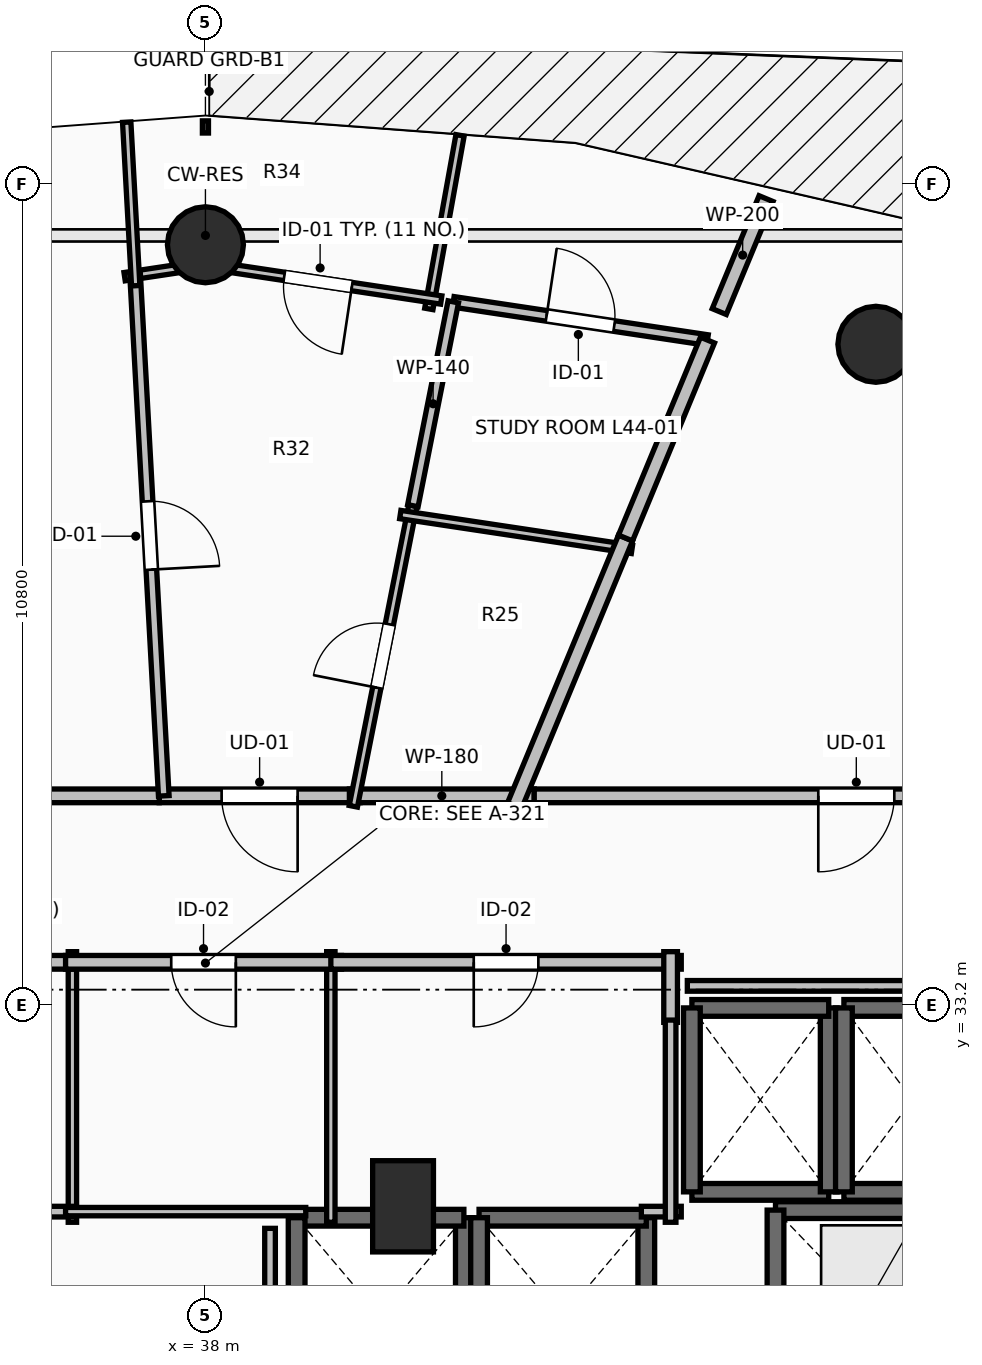
"""IFC4 building model, lengths in metres.
Left out: names, types, materials, properties, quantities, classifications, styles, units other than length and angle.
Written with IfcOpenShell. Run it as: python <this file> out.ifc"""

import sys

from ifc_helpers import new_model, si_unit, direction, frame, frame_2d, origin, origin_2d, place, context, subcontext, project, spatial, rectangle, circle, extrude, element, fill, save


model = new_model("IFC4")
c1 = context("Model", 3, precision=1e-05, world=origin(), true_north=direction((0.0, 1.0)))
c2 = subcontext(c1, "Body", "Model", "MODEL_VIEW")
j1 = project(units=[si_unit("LENGTHUNIT", "METRE"), si_unit("PLANEANGLEUNIT", "RADIAN")], contexts=[c1])
p1 = place(None, origin())
s1 = spatial("IfcSite", under=j1, at=p1, CompositionType="ELEMENT")
p2 = place(p1, origin())
s2 = spatial("IfcBuilding", under=s1, at=p2, CompositionType="ELEMENT")
p3 = place(p2, frame((0.0, 0.0, 164.1)))
s3 = spatial("IfcBuildingStorey", under=s2, at=p3, CompositionType="ELEMENT", Elevation=164.1)
for number, where, z_axis, x_axis in (
    (1, (46.821, 41.891, 0.0), (0.0, 0.0, 1.0), (0.383, 0.924, 0.0)),
    (2, (38.0, 43.2, 0.0), (0.0, 0.0, 1.0), (0.0, 1.0, 0.0)),
):
    element("IfcColumn", number, at=place(p3, frame(where, z_axis=z_axis, x_axis=x_axis)), inside=s3, PredefinedType="COLUMN", context=c2, shape_type="SweptSolid", body=[
        extrude(circle(Radius=0.5, at=origin_2d()), origin(), (0.0, 0.0, 1.0), 3.5),
    ])
p4 = place(p3, frame((40.6, 30.55, 0.0), z_axis=(0.0, 0.0, 1.0), x_axis=(1.0, 0.0, 0.0)))
e3 = element("IfcColumn", 3, at=p4, inside=s3, PredefinedType="PILASTER", context=c2, shape_type="SweptSolid", body=[
    extrude(rectangle(XDim=0.8, YDim=1.2, at=origin_2d()), origin(), (0.0, 0.0, 1.0), 3.5),
])
p5 = place(p3, frame((41.4, 27.8, 0.0), z_axis=(0.0, 0.0, 1.0), x_axis=(0.0, 1.0, 0.0)))
e4 = element("IfcWall", 4, at=p5, inside=s3, PredefinedType="SOLIDWALL", context=c2, shape_type="SweptSolid", body=[
    extrude(rectangle(XDim=2.6, YDim=0.22, at=frame_2d((1.3, 0.0))), origin(), (0.0, 0.0, 1.0), 3.24),
])
p6 = place(p3, frame((41.4, 30.4, 0.0), z_axis=(0.0, 0.0, 1.0), x_axis=(-1.0, 0.0, 0.0)))
e5 = element("IfcWall", 5, at=p6, inside=s3, PredefinedType="SOLIDWALL", context=c2, shape_type="SweptSolid", body=[
    extrude(rectangle(XDim=2.2, YDim=0.22, at=frame_2d((1.1, 0.0))), origin(), (0.0, 0.0, 1.0), 3.24),
])
for number, where, z_axis, x_axis in (
    (6, (39.2, 30.4, 0.0), (0.0, 0.0, 1.0), (0.0, -1.0, 0.0)),
    (7, (43.8, 27.8, 0.0), (0.0, 0.0, 1.0), (0.0, 1.0, 0.0)),
):
    element("IfcWall", number, at=place(p3, frame(where, z_axis=z_axis, x_axis=x_axis)), inside=s3, PredefinedType="SOLIDWALL", context=c2, shape_type="SweptSolid", body=[
        extrude(rectangle(XDim=2.6, YDim=0.22, at=frame_2d((1.3, 0.0))), origin(), (0.0, 0.0, 1.0), 3.24),
    ])
p7 = place(p3, frame((43.8, 30.4, 0.0), z_axis=(0.0, 0.0, 1.0), x_axis=(-1.0, 0.0, 0.0)))
e8 = element("IfcWall", 8, at=p7, inside=s3, PredefinedType="SOLIDWALL", context=c2, shape_type="SweptSolid", body=[
    extrude(rectangle(XDim=2.2, YDim=0.22, at=frame_2d((1.1, 0.0))), origin(), (0.0, 0.0, 1.0), 3.24),
])
p8 = place(p3, frame((41.6, 30.4, 0.0), z_axis=(0.0, 0.0, 1.0), x_axis=(0.0, -1.0, 0.0)))
e9 = element("IfcWall", 9, at=p8, inside=s3, PredefinedType="SOLIDWALL", context=c2, shape_type="SweptSolid", body=[
    extrude(rectangle(XDim=2.6, YDim=0.22, at=frame_2d((1.3, 0.0))), origin(), (0.0, 0.0, 1.0), 3.24),
])
p9 = place(p3, frame((44.4, 30.74, 0.0), z_axis=(0.0, 0.0, 1.0), x_axis=(1.0, 0.0, 0.0)))
e10 = element("IfcWall", 10, at=p9, inside=s3, PredefinedType="SOLIDWALL", context=c2, shape_type="SweptSolid", body=[
    extrude(rectangle(XDim=1.8, YDim=0.22, at=frame_2d((0.9, 0.0))), origin(), (0.0, 0.0, 1.0), 3.24),
])
p10 = place(p3, frame((46.2, 30.74, 0.0), z_axis=(0.0, 0.0, 1.0), x_axis=(0.0, 1.0, 0.0)))
e11 = element("IfcWall", 11, at=p10, inside=s3, PredefinedType="SOLIDWALL", context=c2, shape_type="SweptSolid", body=[
    extrude(rectangle(XDim=2.42, YDim=0.22, at=frame_2d((1.21, 0.0))), origin(), (0.0, 0.0, 1.0), 3.24),
])
p11 = place(p3, frame((46.2, 33.16, 0.0), z_axis=(0.0, 0.0, 1.0), x_axis=(-1.0, 0.0, 0.0)))
e12 = element("IfcWall", 12, at=p11, inside=s3, PredefinedType="SOLIDWALL", context=c2, shape_type="SweptSolid", body=[
    extrude(rectangle(XDim=1.8, YDim=0.22, at=frame_2d((0.9, 0.0))), origin(), (0.0, 0.0, 1.0), 3.24),
])
p12 = place(p3, frame((44.4, 33.16, 0.0), z_axis=(0.0, 0.0, 1.0), x_axis=(0.0, -1.0, 0.0)))
e13 = element("IfcWall", 13, at=p12, inside=s3, PredefinedType="SOLIDWALL", context=c2, shape_type="SweptSolid", body=[
    extrude(rectangle(XDim=2.42, YDim=0.22, at=frame_2d((1.21, 0.0))), origin(), (0.0, 0.0, 1.0), 3.24),
])
for number, where, z_axis, x_axis in (
    (14, (46.4, 30.74, 0.0), (0.0, 0.0, 1.0), (1.0, 0.0, 0.0)),
    (15, (48.2, 33.16, 0.0), (0.0, 0.0, 1.0), (-1.0, 0.0, 0.0)),
):
    element("IfcWall", number, at=place(p3, frame(where, z_axis=z_axis, x_axis=x_axis)), inside=s3, PredefinedType="SOLIDWALL", context=c2, shape_type="SweptSolid", body=[
        extrude(rectangle(XDim=1.8, YDim=0.22, at=frame_2d((0.9, 0.0))), origin(), (0.0, 0.0, 1.0), 3.24),
    ])
p13 = place(p3, frame((46.4, 33.16, 0.0), z_axis=(0.0, 0.0, 1.0), x_axis=(0.0, -1.0, 0.0)))
e16 = element("IfcWall", 16, at=p13, inside=s3, PredefinedType="SOLIDWALL", context=c2, shape_type="SweptSolid", body=[
    extrude(rectangle(XDim=2.42, YDim=0.22, at=frame_2d((1.21, 0.0))), origin(), (0.0, 0.0, 1.0), 3.24),
])
p14 = place(p3, frame((47.9, 30.5, 0.0), z_axis=(0.0, 0.0, 1.0), x_axis=(-1.0, 0.0, 0.0)))
e17 = element("IfcWall", 17, at=p14, inside=s3, PredefinedType="SHEAR", context=c2, shape_type="SweptSolid", body=[
    extrude(rectangle(XDim=2.4, YDim=0.22, at=frame_2d((1.2, 0.0))), origin(), (0.0, 0.0, 1.0), 3.24),
])
p15 = place(p3, frame((45.5, 30.5, 0.0), z_axis=(0.0, 0.0, 1.0), x_axis=(0.0, -1.0, 0.0)))
e18 = element("IfcWall", 18, at=p15, inside=s3, PredefinedType="SHEAR", context=c2, shape_type="SweptSolid", body=[
    extrude(rectangle(XDim=2.5, YDim=0.22, at=frame_2d((1.25, 0.0))), origin(), (0.0, 0.0, 1.0), 3.24),
])
p16 = place(p3, frame((36.25, 30.34, 0.0), z_axis=(0.0, 0.0, 1.0), x_axis=(0.0, 1.0, 0.0)))
e19 = element("IfcWall", 19, at=p16, inside=s3, PredefinedType="PARTITIONING", context=c2, shape_type="SweptSolid", body=[
    extrude(rectangle(XDim=3.56, YDim=0.11, at=frame_2d((1.78, 0.0))), origin(), (0.0, 0.0, 1.0), 2.432),
])
p17 = place(p3, frame((33.5, 30.48, 0.0), z_axis=(0.0, 0.0, 1.0), x_axis=(1.0, 0.0, 0.0)))
e20 = element("IfcWall", 20, at=p17, inside=s3, PredefinedType="PARTITIONING", context=c2, shape_type="SweptSolid", body=[
    extrude(rectangle(XDim=2.75, YDim=0.14, at=frame_2d((1.375, 0.0))), origin(), (0.0, 0.0, 1.0), 2.432),
])
p18 = place(p3, frame((36.25, 33.76, 0.0), z_axis=(0.0, 0.0, 1.0), x_axis=(-1.0, 0.0, 0.0)))
e21 = element("IfcWall", 21, at=p18, inside=s3, PredefinedType="PARTITIONING", context=c2, shape_type="SweptSolid", body=[
    extrude(rectangle(XDim=2.75, YDim=0.18, at=frame_2d((1.375, 0.0))), origin(), (0.0, 0.0, 1.0), 3.24),
])
p19 = place(p18, frame((0.95, 0.0, 0.0)))
e22 = element("IfcOpeningElement", 22, at=p19, cuts=e21, PredefinedType="OPENING", context=c2, shape_type="SweptSolid", body=[
    extrude(rectangle(XDim=0.85, YDim=2.1, at=frame_2d((0.425, 1.05))), frame((0.0, 0.105, 0.0), z_axis=(0.0, -1.0, 0.0), x_axis=(1.0, 0.0, 0.0)), (0.0, 0.0, 1.0), 0.21),
])
p20 = place(p3, frame((39.65, 30.34, 0.0), z_axis=(0.0, 0.0, 1.0), x_axis=(0.0, 1.0, 0.0)))
e23 = element("IfcWall", 23, at=p20, inside=s3, PredefinedType="PARTITIONING", context=c2, shape_type="SweptSolid", body=[
    extrude(rectangle(XDim=3.56, YDim=0.11, at=frame_2d((1.78, 0.0))), origin(), (0.0, 0.0, 1.0), 2.432),
])
p21 = place(p3, frame((36.16, 30.48, 0.0), z_axis=(0.0, 0.0, 1.0), x_axis=(1.0, 0.0, 0.0)))
e24 = element("IfcWall", 24, at=p21, inside=s3, PredefinedType="PARTITIONING", context=c2, shape_type="SweptSolid", body=[
    extrude(rectangle(XDim=3.16, YDim=0.11, at=frame_2d((1.58, 0.0))), origin(), (0.0, 0.0, 1.0), 2.432),
])
p22 = place(p3, frame((39.79, 33.76, 0.0), z_axis=(0.0, 0.0, 1.0), x_axis=(-1.0, 0.0, 0.0)))
e25 = element("IfcWall", 25, at=p22, inside=s3, PredefinedType="PARTITIONING", context=c2, shape_type="SweptSolid", body=[
    extrude(rectangle(XDim=3.63, YDim=0.18, at=frame_2d((1.815, 0.0))), origin(), (0.0, 0.0, 1.0), 3.24),
])
p23 = place(p22, frame((1.39, 0.0, 0.0)))
e26 = element("IfcOpeningElement", 26, at=p23, cuts=e25, PredefinedType="OPENING", context=c2, shape_type="SweptSolid", body=[
    extrude(rectangle(XDim=0.85, YDim=2.1, at=frame_2d((0.425, 1.05))), frame((0.0, 0.105, 0.0), z_axis=(0.0, -1.0, 0.0), x_axis=(1.0, 0.0, 0.0)), (0.0, 0.0, 1.0), 0.21),
])
p24 = place(p3, frame((44.26, 33.76, 0.0), z_axis=(0.0, 0.0, 1.0), x_axis=(-1.0, 0.0, 0.0)))
e27 = element("IfcWall", 27, at=p24, inside=s3, PredefinedType="PARTITIONING", context=c2, shape_type="SweptSolid", body=[
    extrude(rectangle(XDim=4.61, YDim=0.18, at=frame_2d((2.305, 0.0))), origin(), (0.0, 0.0, 1.0), 3.24),
])
p25 = place(p24, frame((1.88, 0.0, 0.0)))
e28 = element("IfcOpeningElement", 28, at=p25, cuts=e27, PredefinedType="OPENING", context=c2, shape_type="SweptSolid", body=[
    extrude(rectangle(XDim=0.85, YDim=2.1, at=frame_2d((0.425, 1.05))), frame((0.0, 0.105, 0.0), z_axis=(0.0, -1.0, 0.0), x_axis=(1.0, 0.0, 0.0)), (0.0, 0.0, 1.0), 0.21),
])
p26 = place(p3, frame((44.12, 32.97, 0.0), z_axis=(0.0, 0.0, 1.0), x_axis=(0.0, 1.0, 0.0)))
e29 = element("IfcWall", 29, at=p26, inside=s3, PredefinedType="PARTITIONING", context=c2, shape_type="SweptSolid", body=[
    extrude(rectangle(XDim=0.93, YDim=0.18, at=frame_2d((0.465, 0.0))), origin(), (0.0, 0.0, 1.0), 3.24),
])
p27 = place(p3, frame((40.034, 35.95, 0.0), z_axis=(0.0, 0.0, 1.0), x_axis=(-1.0, 0.0, 0.0)))
e30 = element("IfcWall", 30, at=p27, inside=s3, PredefinedType="PARTITIONING", context=c2, shape_type="SweptSolid", body=[
    extrude(rectangle(XDim=2.642, YDim=0.18, at=frame_2d((1.321, 0.0))), origin(), (0.0, 0.0, 1.0), 3.24),
])
p28 = place(p27, frame((0.821, 0.0, 0.0)))
e31 = element("IfcOpeningElement", 31, at=p28, cuts=e30, PredefinedType="OPENING", context=c2, shape_type="SweptSolid", body=[
    extrude(rectangle(XDim=1.0, YDim=2.15, at=frame_2d((0.5, 1.075))), frame((0.0, 0.105, 0.0), z_axis=(0.0, -1.0, 0.0), x_axis=(1.0, 0.0, 0.0)), (0.0, 0.0, 1.0), 0.21),
])
p29 = place(p3, frame((42.326, 35.95, 0.0), z_axis=(0.0, 0.0, 1.0), x_axis=(-1.0, 0.0, 0.0)))
e32 = element("IfcWall", 32, at=p29, inside=s3, PredefinedType="PARTITIONING", context=c2, shape_type="SweptSolid", body=[
    extrude(rectangle(XDim=2.432, YDim=0.18, at=frame_2d((1.216, 0.0))), origin(), (0.0, 0.0, 1.0), 3.24),
])
p30 = place(p3, frame((37.392, 35.95, 0.0), z_axis=(0.0, 0.0, 1.0), x_axis=(-1.0, 0.0, 0.0)))
e33 = element("IfcWall", 33, at=p30, inside=s3, PredefinedType="PARTITIONING", context=c2, shape_type="SweptSolid", body=[
    extrude(rectangle(XDim=1.863, YDim=0.18, at=frame_2d((0.932, 0.0))), origin(), (0.0, 0.0, 1.0), 3.24),
])
p31 = place(p3, frame((50.8, 35.95, 0.0), z_axis=(0.0, 0.0, 1.0), x_axis=(-1.0, 0.0, 0.0)))
e34 = element("IfcWall", 34, at=p31, inside=s3, PredefinedType="PARTITIONING", context=c2, shape_type="SweptSolid", body=[
    extrude(rectangle(XDim=8.474, YDim=0.18, at=frame_2d((4.237, 0.0))), origin(), (0.0, 0.0, 1.0), 2.432),
])
p32 = place(p31, frame((3.737, 0.0, 0.0)))
e35 = element("IfcOpeningElement", 35, at=p32, cuts=e34, PredefinedType="OPENING", context=c2, shape_type="SweptSolid", body=[
    extrude(rectangle(XDim=1.0, YDim=2.15, at=frame_2d((0.5, 1.075))), frame((0.0, 0.105, 0.0), z_axis=(0.0, -1.0, 0.0), x_axis=(1.0, 0.0, 0.0)), (0.0, 0.0, 1.0), 0.21),
])
p33 = place(p3, frame((39.946, 35.813, 0.0), z_axis=(0.0, 0.0, 1.0), x_axis=(0.194333977895, 0.980935423479, 0.0)))
e36 = element("IfcWall", 36, at=p33, inside=s3, PredefinedType="PARTITIONING", context=c2, shape_type="SweptSolid", body=[
    extrude(rectangle(XDim=4.031, YDim=0.11, at=frame_2d((2.016, 0.0))), origin(), (0.0, 0.0, 1.0), 2.886),
])
p34 = place(p33, frame((1.591, 0.0, 0.0)))
e37 = element("IfcOpeningElement", 37, at=p34, cuts=e36, PredefinedType="OPENING", context=c2, shape_type="SweptSolid", body=[
    extrude(rectangle(XDim=0.85, YDim=2.1, at=frame_2d((0.425, 1.05))), frame((0.0, 0.07, 0.0), z_axis=(0.0, -1.0, 0.0), x_axis=(1.0, 0.0, 0.0)), (0.0, 0.0, 1.0), 0.14),
])
p35 = place(p3, frame((41.35, 44.64, 0.0), z_axis=(0.0, 0.0, 1.0), x_axis=(-0.176977699102, -0.984214861715, 0.0)))
e38 = element("IfcWall", 38, at=p35, inside=s3, PredefinedType="PARTITIONING", context=c2, shape_type="SweptSolid", body=[
    extrude(rectangle(XDim=2.32, YDim=0.11, at=frame_2d((1.16, 0.0))), origin(), (0.0, 0.0, 1.0), 2.728),
])
p36 = place(p3, frame((41.102, 42.473, 0.0), z_axis=(0.0, 0.0, 1.0), x_axis=(-0.98887178047, 0.148770298749, 0.0)))
e39 = element("IfcWall", 39, at=p36, inside=s3, PredefinedType="PARTITIONING", context=c2, shape_type="SweptSolid", body=[
    extrude(rectangle(XDim=3.277, YDim=0.11, at=frame_2d((1.639, 0.0))), origin(), (0.0, 0.0, 1.0), 2.432),
])
p37 = place(p36, frame((1.189, 0.0, 0.0)))
e40 = element("IfcOpeningElement", 40, at=p37, cuts=e39, PredefinedType="OPENING", context=c2, shape_type="SweptSolid", body=[
    extrude(rectangle(XDim=0.9, YDim=2.1, at=frame_2d((0.45, 1.05))), frame((0.0, 0.07, 0.0), z_axis=(0.0, -1.0, 0.0), x_axis=(1.0, 0.0, 0.0)), (0.0, 0.0, 1.0), 0.14),
])
p38 = place(p3, frame((38.138, 42.961, 0.0), z_axis=(0.0, 0.0, 1.0), x_axis=(-0.988920139242, -0.148448503534, 0.0)))
e41 = element("IfcWall", 41, at=p38, inside=s3, PredefinedType="PARTITIONING", context=c2, shape_type="SweptSolid", body=[
    extrude(rectangle(XDim=1.215, YDim=0.11, at=frame_2d((0.608, 0.0))), origin(), (0.0, 0.0, 1.0), 2.432),
])
p39 = place(p3, frame((41.261, 42.449, 0.0), z_axis=(0.0, 0.0, 1.0), x_axis=(0.988878555922, -0.148725255545, 0.0)))
e42 = element("IfcWall", 42, at=p39, inside=s3, PredefinedType="PARTITIONING", context=c2, shape_type="SweptSolid", body=[
    extrude(rectangle(XDim=3.382, YDim=0.14, at=frame_2d((1.691, 0.0))), origin(), (0.0, 0.0, 1.0), 3.24),
])
p40 = place(p39, frame((1.241, 0.0, 0.0)))
e43 = element("IfcOpeningElement", 43, at=p40, cuts=e42, PredefinedType="OPENING", context=c2, shape_type="SweptSolid", body=[
    extrude(rectangle(XDim=0.9, YDim=2.1, at=frame_2d((0.45, 1.05))), frame((0.0, 0.085, 0.0), z_axis=(0.0, -1.0, 0.0), x_axis=(1.0, 0.0, 0.0)), (0.0, 0.0, 1.0), 0.17),
])
p41 = place(p3, frame((40.729, 39.767, 0.0), z_axis=(0.0, 0.0, 1.0), x_axis=(0.194501549107, 0.980902210924, 0.0)))
e44 = element("IfcWall", 44, at=p41, inside=s3, PredefinedType="PARTITIONING", context=c2, shape_type="SweptSolid", body=[
    extrude(rectangle(XDim=2.734, YDim=0.14, at=frame_2d((1.367, 0.0))), origin(), (0.0, 0.0, 1.0), 2.886),
])
p42 = place(p3, frame((37.075, 42.801, 0.0), z_axis=(0.0, 0.0, 1.0), x_axis=(0.054937930554, -0.998489771498, 0.0)))
e45 = element("IfcWall", 45, at=p42, inside=s3, PredefinedType="PARTITIONING", context=c2, shape_type="SweptSolid", body=[
    extrude(rectangle(XDim=6.861, YDim=0.14, at=frame_2d((3.431, 0.0))), origin(), (0.0, 0.0, 1.0), 2.432),
])
p43 = place(p42, frame((2.981, 0.0, 0.0)))
e46 = element("IfcOpeningElement", 46, at=p43, cuts=e45, PredefinedType="OPENING", context=c2, shape_type="SweptSolid", body=[
    extrude(rectangle(XDim=0.9, YDim=2.1, at=frame_2d((0.45, 1.05))), frame((0.0, 0.085, 0.0), z_axis=(0.0, -1.0, 0.0), x_axis=(1.0, 0.0, 0.0)), (0.0, 0.0, 1.0), 0.17),
])
p44 = place(p3, frame((44.76, 42.321, 0.0), z_axis=(0.0, 0.0, 1.0), x_axis=(0.382955001099, 0.923766998292, 0.0)))
e47 = element("IfcWall", 47, at=p44, inside=s3, PredefinedType="PARTITIONING", context=c2, shape_type="SweptSolid", body=[
    extrude(rectangle(XDim=1.608, YDim=0.2, at=frame_2d((0.804, 0.0))), origin(), (0.0, 0.0, 1.0), 2.728),
])
p45 = place(p3, frame((43.611, 39.192, 0.0), z_axis=(0.0, 0.0, 1.0), x_axis=(-0.988860105068, 0.148847884116, 0.0)))
e48 = element("IfcWall", 48, at=p45, inside=s3, PredefinedType="PARTITIONING", context=c2, shape_type="SweptSolid", body=[
    extrude(rectangle(XDim=3.082, YDim=0.11, at=frame_2d((1.541, 0.0))), origin(), (0.0, 0.0, 1.0), 2.886),
])
p46 = place(p3, frame((42.067, 35.821, 0.0), z_axis=(0.0, 0.0, 1.0), x_axis=(0.382813734438, 0.92382554886, 0.0)))
e49 = element("IfcWall", 49, at=p46, inside=s3, PredefinedType="PARTITIONING", context=c2, shape_type="SweptSolid", body=[
    extrude(rectangle(XDim=3.812, YDim=0.2, at=frame_2d((1.906, 0.0))), origin(), (0.0, 0.0, 1.0), 2.886),
])
p47 = place(p3, frame((36.964, 44.813, 0.0), z_axis=(0.0, 0.0, 1.0), x_axis=(0.054949193079, -0.998489151759, 0.0)))
e50 = element("IfcWall", 50, at=p47, inside=s3, PredefinedType="PARTITIONING", context=c2, shape_type="SweptSolid", body=[
    extrude(rectangle(XDim=2.155, YDim=0.11, at=frame_2d((1.077, 0.0))), origin(), (0.0, 0.0, 1.0), 2.432),
])
p48 = place(p3, frame((43.527, 39.342, 0.0), z_axis=(0.0, 0.0, 1.0), x_axis=(0.38263998022, 0.923897529782, 0.0)))
e51 = element("IfcWall", 51, at=p48, inside=s3, PredefinedType="PARTITIONING", context=c2, shape_type="SweptSolid", body=[
    extrude(rectangle(XDim=2.818, YDim=0.2, at=frame_2d((1.409, 0.0))), origin(), (0.0, 0.0, 1.0), 2.886),
])
p49 = place(p3, frame((43.735, 30.48, 0.0), z_axis=(0.0, 0.0, 1.0), x_axis=(1.0, 0.0, 0.0)))
e52 = element("IfcWall", 52, at=p49, inside=s3, PredefinedType="PARTITIONING", context=c2, shape_type="SweptSolid", body=[
    extrude(rectangle(XDim=0.525, YDim=0.14, at=frame_2d((0.262, 0.0))), origin(), (0.0, 0.0, 1.0), 3.24),
])
p50 = place(p3, frame((44.12, 30.34, 0.0), z_axis=(0.0, 0.0, 1.0), x_axis=(0.0, 1.0, 0.0)))
e53 = element("IfcWall", 53, at=p50, inside=s3, PredefinedType="PARTITIONING", context=c2, shape_type="SweptSolid", body=[
    extrude(rectangle(XDim=2.66, YDim=0.14, at=frame_2d((1.33, 0.0))), origin(), (0.0, 0.0, 1.0), 3.24),
])
p51 = place(p3, frame((38.85, 27.87, 0.0), z_axis=(0.0, 0.0, 1.0), x_axis=(0.0, 1.0, 0.0)))
e54 = element("IfcWall", 54, at=p51, inside=s3, PredefinedType="PARTITIONING", context=c2, shape_type="SweptSolid", body=[
    extrude(rectangle(XDim=2.39, YDim=0.14, at=frame_2d((1.195, 0.0))), origin(), (0.0, 0.0, 1.0), 3.24),
])
p52 = place(p3, frame((48.55, 33.45, 0.0), z_axis=(0.0, 0.0, 1.0), x_axis=(-1.0, 0.0, 0.0)))
e55 = element("IfcWall", 55, at=p52, inside=s3, PredefinedType="PARTITIONING", context=c2, shape_type="SweptSolid", body=[
    extrude(rectangle(XDim=4.21, YDim=0.14, at=frame_2d((2.105, 0.0))), origin(), (0.0, 0.0, 1.0), 2.432),
])
p53 = place(p23, origin())
e56 = element("IfcDoor", 56, at=p53, inside=s3, OperationType="SINGLE_SWING_LEFT", PredefinedType="DOOR", context=c2, shape_type="SweptSolid", body=[
    extrude(rectangle(XDim=0.85, YDim=2.1, at=frame_2d((0.425, 1.05))), frame((0.0, 0.025, 0.0), z_axis=(0.0, -1.0, 0.0), x_axis=(1.0, 0.0, 0.0)), (0.0, 0.0, 1.0), 0.05),
])
fill(e26, e56)
p54 = place(p25, origin())
e57 = element("IfcDoor", 57, at=p54, inside=s3, OperationType="SINGLE_SWING_RIGHT", PredefinedType="DOOR", context=c2, shape_type="SweptSolid", body=[
    extrude(rectangle(XDim=0.85, YDim=2.1, at=frame_2d((0.425, 1.05))), frame((0.0, 0.025, 0.0), z_axis=(0.0, -1.0, 0.0), x_axis=(1.0, 0.0, 0.0)), (0.0, 0.0, 1.0), 0.05),
])
fill(e28, e57)
p55 = place(p28, origin())
e58 = element("IfcDoor", 58, at=p55, inside=s3, OperationType="SINGLE_SWING_LEFT", PredefinedType="DOOR", context=c2, shape_type="SweptSolid", body=[
    extrude(rectangle(XDim=1.0, YDim=2.15, at=frame_2d((0.5, 1.075))), frame((0.0, 0.025, 0.0), z_axis=(0.0, -1.0, 0.0), x_axis=(1.0, 0.0, 0.0)), (0.0, 0.0, 1.0), 0.05),
])
fill(e31, e58)
p56 = place(p32, origin())
e59 = element("IfcDoor", 59, at=p56, inside=s3, OperationType="SINGLE_SWING_RIGHT", PredefinedType="DOOR", context=c2, shape_type="SweptSolid", body=[
    extrude(rectangle(XDim=1.0, YDim=2.15, at=frame_2d((0.5, 1.075))), frame((0.0, 0.025, 0.0), z_axis=(0.0, -1.0, 0.0), x_axis=(1.0, 0.0, 0.0)), (0.0, 0.0, 1.0), 0.05),
])
fill(e35, e59)
p57 = place(p34, origin())
e60 = element("IfcDoor", 60, at=p57, inside=s3, OperationType="SINGLE_SWING_LEFT", PredefinedType="DOOR", context=c2, shape_type="SweptSolid", body=[
    extrude(rectangle(XDim=0.85, YDim=2.1, at=frame_2d((0.425, 1.05))), frame((0.0, 0.025, 0.0), z_axis=(0.0, -1.0, 0.0), x_axis=(1.0, 0.0, 0.0)), (0.0, 0.0, 1.0), 0.05),
])
fill(e37, e60)
p58 = place(p37, origin())
e61 = element("IfcDoor", 61, at=p58, inside=s3, OperationType="SINGLE_SWING_LEFT", PredefinedType="DOOR", context=c2, shape_type="SweptSolid", body=[
    extrude(rectangle(XDim=0.9, YDim=2.1, at=frame_2d((0.45, 1.05))), frame((0.0, 0.025, 0.0), z_axis=(0.0, -1.0, 0.0), x_axis=(1.0, 0.0, 0.0)), (0.0, 0.0, 1.0), 0.05),
])
fill(e40, e61)
p59 = place(p40, origin())
e62 = element("IfcDoor", 62, at=p59, inside=s3, OperationType="SINGLE_SWING_LEFT", PredefinedType="DOOR", context=c2, shape_type="SweptSolid", body=[
    extrude(rectangle(XDim=0.9, YDim=2.1, at=frame_2d((0.45, 1.05))), frame((0.0, 0.025, 0.0), z_axis=(0.0, -1.0, 0.0), x_axis=(1.0, 0.0, 0.0)), (0.0, 0.0, 1.0), 0.05),
])
fill(e43, e62)
p60 = place(p43, origin())
e63 = element("IfcDoor", 63, at=p60, inside=s3, OperationType="SINGLE_SWING_RIGHT", PredefinedType="DOOR", context=c2, shape_type="SweptSolid", body=[
    extrude(rectangle(XDim=0.9, YDim=2.1, at=frame_2d((0.45, 1.05))), frame((0.0, 0.025, 0.0), z_axis=(0.0, -1.0, 0.0), x_axis=(1.0, 0.0, 0.0)), (0.0, 0.0, 1.0), 0.05),
])
fill(e46, e63)
save(model, sys.argv[1])
